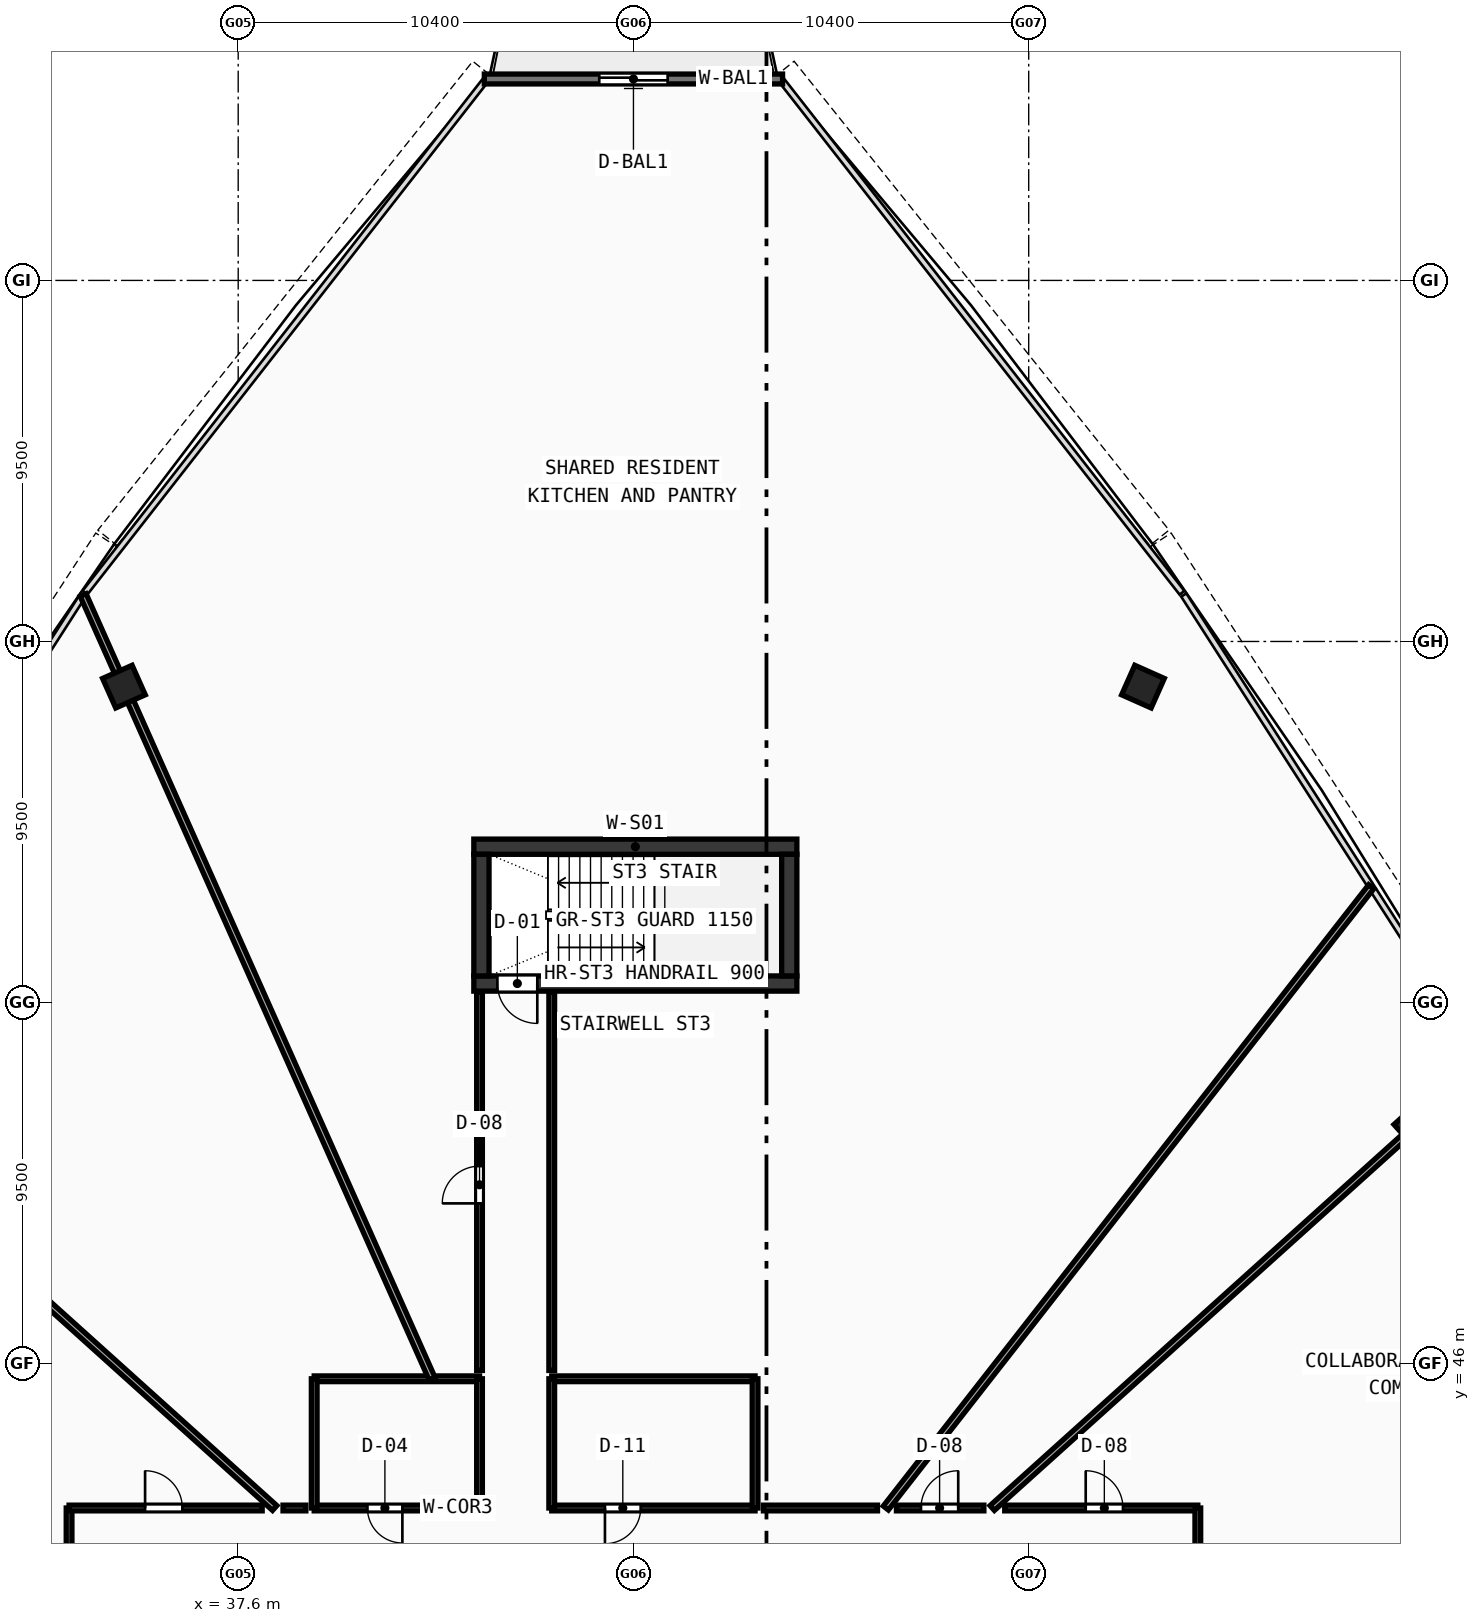
"""IFC4 building model, lengths in metres.
Left out: names, types, materials, properties, quantities, classifications, styles, units other than length and angle.
Written with IfcOpenShell. Run it as: python <this file> out.ifc"""

import sys

from ifc_helpers import new_model, si_unit, direction, frame, frame_2d, origin, origin_with_axes, origin_2d, place, context, subcontext, project, spatial, rectangle, hollow_rectangle, extrude, source, transform, mapped, element, fill, save


model = new_model("IFC4")
c1 = context("Model", 3, precision=1e-05, world=origin(), true_north=direction((0.0, 1.0)))
c2 = subcontext(c1, "Body", "Model", "MODEL_VIEW")
j1 = project(units=[si_unit("LENGTHUNIT", "METRE"), si_unit("PLANEANGLEUNIT", "RADIAN")], contexts=[c1])
p1 = place(None, origin())
s1 = spatial("IfcSite", under=j1, at=p1, CompositionType="ELEMENT")
p2 = place(p1, origin())
s2 = spatial("IfcBuilding", under=s1, at=p2, CompositionType="ELEMENT")
p3 = place(p2, frame((0.0, 0.0, 240.8)))
s3 = spatial("IfcBuildingStorey", under=s2, at=p3, CompositionType="ELEMENT", Elevation=240.8)
p4 = place(p3, frame((43.8, 59.6, 0.0), z_axis=(0.0, 0.0, 1.0), x_axis=(1.0, 0.0, 0.0)))
e1 = element("IfcWall", 1, at=p4, inside=s3, PredefinedType="SHEAR", context=c2, shape_type="SweptSolid", body=[
    extrude(rectangle(XDim=8.5, YDim=0.4, at=frame_2d((4.25, 0.0))), origin(), (0.0, 0.0, 1.0), 3.47),
])
p5 = place(p3, frame((43.8, 56.0, 0.0), z_axis=(0.0, 0.0, 1.0), x_axis=(1.0, 0.0, 0.0)))
e2 = element("IfcWall", 2, at=p5, inside=s3, PredefinedType="SHEAR", context=c2, shape_type="SweptSolid", body=[
    extrude(rectangle(XDim=8.5, YDim=0.4, at=frame_2d((4.25, 0.0))), origin(), (0.0, 0.0, 1.0), 3.47),
])
p6 = place(p5, frame((0.62, 0.0, 0.0)))
e3 = element("IfcOpeningElement", 3, at=p6, cuts=e2, PredefinedType="OPENING", context=c2, shape_type="SweptSolid", body=[
    extrude(rectangle(XDim=1.05, YDim=2.1, at=frame_2d((0.525, 1.05))), frame((0.0, 0.21, 0.0), z_axis=(0.0, -1.0, 0.0), x_axis=(1.0, 0.0, 0.0)), (0.0, 0.0, 1.0), 0.42),
])
for number, where, z_axis, x_axis in (
    (4, (44.0, 56.2, 0.0), (0.0, 0.0, 1.0), (0.0, 1.0, 0.0)),
    (5, (52.1, 56.2, 0.0), (0.0, 0.0, 1.0), (0.0, 1.0, 0.0)),
):
    element("IfcWall", number, at=place(p3, frame(where, z_axis=z_axis, x_axis=x_axis)), inside=s3, PredefinedType="SHEAR", context=c2, shape_type="SweptSolid", body=[
        extrude(rectangle(XDim=3.2, YDim=0.4, at=frame_2d((1.6, 0.0))), origin(), (0.0, 0.0, 1.0), 3.47),
    ])
m1 = source(origin(), c2, "Body", "SweptSolid", [
    extrude(hollow_rectangle(XDim=0.85, YDim=0.85, WallThickness=0.034, at=origin_2d()), origin(), (0.0, 0.0, 1.0), 3.73),
])
for number, where, z_axis, x_axis in (
    (6, (68.612, 52.259, -0.26), (0.0, 0.0, 1.0), (-0.669, 0.743, 0.0)),
    (7, (61.407, 63.812, -0.26), (0.0, 0.0, 1.0), (-0.914, 0.407, 0.0)),
    (8, (34.593, 63.812, -0.26), (0.0, 0.0, 1.0), (-0.914, -0.407, 0.0)),
):
    element("IfcColumn", number, at=place(p3, frame(where, z_axis=z_axis, x_axis=x_axis)), inside=s3, PredefinedType="COLUMN", context=c2, shape_type="MappedRepresentation", body=[
        mapped(m1, transform((0.0, 0.0, 0.0), scale=1.0)),
    ])
p7 = place(p3, frame((51.924, 79.8, 0.0), z_axis=(0.0, 0.0, 1.0), x_axis=(-1.0, 0.0, 0.0)))
e9 = element("IfcWall", 9, at=p7, inside=s3, PredefinedType="STANDARD", context=c2, shape_type="SweptSolid", body=[
    extrude(rectangle(XDim=7.847, YDim=0.26, at=frame_2d((3.924, 0.0))), origin(), (0.0, 0.0, 1.0), 3.47),
])
p8 = place(p7, frame((3.024, 0.0, 0.0)))
e10 = element("IfcOpeningElement", 10, at=p8, cuts=e9, PredefinedType="OPENING", context=c2, shape_type="SweptSolid", body=[
    extrude(rectangle(XDim=1.8, YDim=2.15, at=frame_2d((0.9, 1.075))), frame((0.0, 0.14, 0.0), z_axis=(0.0, -1.0, 0.0), x_axis=(1.0, 0.0, 0.0)), (0.0, 0.0, 1.0), 0.28),
])
p9 = place(p3, frame((39.6, 42.2, 0.0), z_axis=(0.0, 0.0, 1.0), x_axis=(1.0, 0.0, 0.0)))
e11 = element("IfcWall", 11, at=p9, inside=s3, PredefinedType="PARTITIONING", context=c2, shape_type="SweptSolid", body=[
    extrude(rectangle(XDim=4.35, YDim=0.15, at=frame_2d((2.175, 0.0))), origin(), (0.0, 0.0, 1.0), 3.47),
])
p10 = place(p9, frame((1.4, 0.0, 0.0)))
e12 = element("IfcOpeningElement", 12, at=p10, cuts=e11, PredefinedType="OPENING", context=c2, shape_type="SweptSolid", body=[
    extrude(rectangle(XDim=0.92, YDim=2.1, at=frame_2d((0.46, 1.05))), frame((0.0, 0.085, 0.0), z_axis=(0.0, -1.0, 0.0), x_axis=(1.0, 0.0, 0.0)), (0.0, 0.0, 1.0), 0.17),
])
p11 = place(p3, frame((39.6, 45.6, 0.0), z_axis=(0.0, 0.0, 1.0), x_axis=(1.0, 0.0, 0.0)))
e13 = element("IfcWall", 13, at=p11, inside=s3, PredefinedType="PARTITIONING", context=c2, shape_type="SweptSolid", body=[
    extrude(rectangle(XDim=4.35, YDim=0.15, at=frame_2d((2.175, 0.0))), origin(), (0.0, 0.0, 1.0), 2.82),
])
p12 = place(p3, frame((39.6, 42.2, 0.0), z_axis=(0.0, 0.0, 1.0), x_axis=(0.0, 1.0, 0.0)))
e14 = element("IfcWall", 14, at=p12, inside=s3, PredefinedType="PARTITIONING", context=c2, shape_type="SweptSolid", body=[
    extrude(rectangle(XDim=3.4, YDim=0.15, at=frame_2d((1.7, 0.0))), origin(), (0.0, 0.0, 1.0), 3.47),
])
p13 = place(p3, frame((43.95, 42.2, 0.0), z_axis=(0.0, 0.0, 1.0), x_axis=(0.0, 1.0, 0.0)))
e15 = element("IfcWall", 15, at=p13, inside=s3, PredefinedType="PARTITIONING", context=c2, shape_type="SweptSolid", body=[
    extrude(rectangle(XDim=3.4, YDim=0.15, at=frame_2d((1.7, 0.0))), origin(), (0.0, 0.0, 1.0), 2.82),
])
p14 = place(p3, frame((45.85, 42.2, 0.0), z_axis=(0.0, 0.0, 1.0), x_axis=(1.0, 0.0, 0.0)))
e16 = element("IfcWall", 16, at=p14, inside=s3, PredefinedType="PARTITIONING", context=c2, shape_type="SweptSolid", body=[
    extrude(rectangle(XDim=5.35, YDim=0.15, at=frame_2d((2.675, 0.0))), origin(), (0.0, 0.0, 1.0), 3.47),
])
p15 = place(p14, frame((1.4, 0.0, 0.0)))
e17 = element("IfcOpeningElement", 17, at=p15, cuts=e16, PredefinedType="OPENING", context=c2, shape_type="SweptSolid", body=[
    extrude(rectangle(XDim=0.94, YDim=2.1, at=frame_2d((0.47, 1.05))), frame((0.0, 0.085, 0.0), z_axis=(0.0, -1.0, 0.0), x_axis=(1.0, 0.0, 0.0)), (0.0, 0.0, 1.0), 0.17),
])
p16 = place(p3, frame((45.85, 45.6, 0.0), z_axis=(0.0, 0.0, 1.0), x_axis=(1.0, 0.0, 0.0)))
e18 = element("IfcWall", 18, at=p16, inside=s3, PredefinedType="PARTITIONING", context=c2, shape_type="SweptSolid", body=[
    extrude(rectangle(XDim=5.35, YDim=0.15, at=frame_2d((2.675, 0.0))), origin(), (0.0, 0.0, 1.0), 3.47),
])
for number, where, z_axis, x_axis in (
    (19, (45.85, 42.2, 0.0), (0.0, 0.0, 1.0), (0.0, 1.0, 0.0)),
    (20, (51.2, 42.2, 0.0), (0.0, 0.0, 1.0), (0.0, 1.0, 0.0)),
):
    element("IfcWall", number, at=place(p3, frame(where, z_axis=z_axis, x_axis=x_axis)), inside=s3, PredefinedType="PARTITIONING", context=c2, shape_type="SweptSolid", body=[
        extrude(rectangle(XDim=3.4, YDim=0.15, at=frame_2d((1.7, 0.0))), origin(), (0.0, 0.0, 1.0), 3.47),
    ])
p17 = place(p3, frame((62.85, 38.525, 0.0), z_axis=(0.0, 0.0, 1.0), x_axis=(0.951060404644, 0.309005027011, 0.0)))
e21 = element("IfcWall", 21, at=p17, inside=s3, PredefinedType="PARTITIONING", context=c2, shape_type="SweptSolid", body=[
    extrude(rectangle(XDim=14.032, YDim=0.17, at=frame_2d((7.016, 0.0))), origin(), (0.0, 0.0, 1.0), 2.82),
])
p18 = place(p3, frame((57.44, 42.2, 0.0), z_axis=(0.0, 0.0, 1.0), x_axis=(0.743140424774, 0.669135493802, 0.0)))
e22 = element("IfcWall", 22, at=p18, inside=s3, PredefinedType="PARTITIONING", context=c2, shape_type="SweptSolid", body=[
    extrude(rectangle(XDim=17.455, YDim=0.17, at=frame_2d((8.728, 0.0))), origin(), (0.0, 0.0, 1.0), 2.82),
])
p19 = place(p3, frame((54.641, 42.2, 0.0), z_axis=(0.0, 0.0, 1.0), x_axis=(0.615664824624, 0.788008136837, 0.0)))
e23 = element("IfcWall", 23, at=p19, inside=s3, PredefinedType="PARTITIONING", context=c2, shape_type="SweptSolid", body=[
    extrude(rectangle(XDim=20.745, YDim=0.17, at=frame_2d((10.372, 0.0))), origin(), (0.0, 0.0, 1.0), 2.82),
])
p20 = place(p3, frame((42.702, 45.6, 0.0), z_axis=(0.0, 0.0, 1.0), x_axis=(-0.406745472033, 0.913541526686, 0.0)))
e24 = element("IfcWall", 24, at=p20, inside=s3, PredefinedType="PARTITIONING", context=c2, shape_type="SweptSolid", body=[
    extrude(rectangle(XDim=22.574, YDim=0.17, at=frame_2d((11.287, 0.0))), origin(), (0.0, 0.0, 1.0), 2.82),
])
p21 = place(p3, frame((38.56, 42.2, 0.0), z_axis=(0.0, 0.0, 1.0), x_axis=(-0.743140424774, 0.669135493802, 0.0)))
e25 = element("IfcWall", 25, at=p21, inside=s3, PredefinedType="PARTITIONING", context=c2, shape_type="SweptSolid", body=[
    extrude(rectangle(XDim=17.455, YDim=0.17, at=frame_2d((8.728, 0.0))), origin(), (0.0, 0.0, 1.0), 2.82),
])
p22 = place(p3, frame((33.15, 38.525, 0.0), z_axis=(0.0, 0.0, 1.0), x_axis=(-0.951060404644, 0.309005027011, 0.0)))
e26 = element("IfcWall", 26, at=p22, inside=s3, PredefinedType="PARTITIONING", context=c2, shape_type="SweptSolid", body=[
    extrude(rectangle(XDim=14.032, YDim=0.17, at=frame_2d((7.016, 0.0))), origin(), (0.0, 0.0, 1.0), 2.82),
])
p23 = place(p3, frame((33.15, 38.756, 0.0), z_axis=(0.0, 0.0, 1.0), x_axis=(0.0, 1.0, 0.0)))
e27 = element("IfcWall", 27, at=p23, inside=s3, PredefinedType="PARTITIONING", context=c2, shape_type="SweptSolid", body=[
    extrude(rectangle(XDim=3.444, YDim=0.15, at=frame_2d((1.722, 0.0))), origin(), (0.0, 0.0, 1.0), 3.12),
])
p24 = place(p3, frame((33.15, 42.2, 0.0), z_axis=(0.0, 0.0, 1.0), x_axis=(1.0, 0.0, 0.0)))
e28 = element("IfcWall", 28, at=p24, inside=s3, PredefinedType="PARTITIONING", context=c2, shape_type="SweptSolid", body=[
    extrude(rectangle(XDim=5.081, YDim=0.15, at=frame_2d((2.541, 0.0))), origin(), (0.0, 0.0, 1.0), 3.12),
])
p25 = place(p24, frame((2.0, 0.0, 0.0)))
e29 = element("IfcOpeningElement", 29, at=p25, cuts=e28, PredefinedType="OPENING", context=c2, shape_type="SweptSolid", body=[
    extrude(rectangle(XDim=0.98, YDim=2.12, at=frame_2d((0.49, 1.06))), frame((0.0, 0.085, 0.0), z_axis=(0.0, -1.0, 0.0), x_axis=(1.0, 0.0, 0.0)), (0.0, 0.0, 1.0), 0.17),
])
p26 = place(p3, frame((38.78, 42.2, 0.0), z_axis=(0.0, 0.0, 1.0), x_axis=(1.0, 0.0, 0.0)))
e30 = element("IfcWall", 30, at=p26, inside=s3, PredefinedType="PARTITIONING", context=c2, shape_type="SweptSolid", body=[
    extrude(rectangle(XDim=0.6, YDim=0.15, at=frame_2d((0.3, 0.0))), origin(), (0.0, 0.0, 1.0), 2.82),
])
p27 = place(p3, frame((43.95, 45.82, 0.0), z_axis=(0.0, 0.0, 1.0), x_axis=(0.0, 1.0, 0.0)))
e31 = element("IfcWall", 31, at=p27, inside=s3, PredefinedType="PARTITIONING", context=c2, shape_type="SweptSolid", body=[
    extrude(rectangle(XDim=9.96, YDim=0.15, at=frame_2d((4.98, 0.0))), origin(), (0.0, 0.0, 1.0), 3.12),
])
p28 = place(p27, frame((4.395, 0.0, 0.0)))
e32 = element("IfcOpeningElement", 32, at=p28, cuts=e31, PredefinedType="OPENING", context=c2, shape_type="SweptSolid", body=[
    extrude(rectangle(XDim=0.98, YDim=2.12, at=frame_2d((0.49, 1.06))), frame((0.0, 0.085, 0.0), z_axis=(0.0, -1.0, 0.0), x_axis=(1.0, 0.0, 0.0)), (0.0, 0.0, 1.0), 0.17),
])
p29 = place(p3, frame((45.85, 55.78, 0.0), z_axis=(0.0, 0.0, 1.0), x_axis=(0.0, -1.0, 0.0)))
e33 = element("IfcWall", 33, at=p29, inside=s3, PredefinedType="PARTITIONING", context=c2, shape_type="SweptSolid", body=[
    extrude(rectangle(XDim=9.96, YDim=0.15, at=frame_2d((4.98, 0.0))), origin(), (0.0, 0.0, 1.0), 3.12),
])
p30 = place(p3, frame((51.42, 42.2, 0.0), z_axis=(0.0, 0.0, 1.0), x_axis=(1.0, 0.0, 0.0)))
e34 = element("IfcWall", 34, at=p30, inside=s3, PredefinedType="PARTITIONING", context=c2, shape_type="SweptSolid", body=[
    extrude(rectangle(XDim=3.001, YDim=0.15, at=frame_2d((1.5, 0.0))), origin(), (0.0, 0.0, 1.0), 2.82),
])
p31 = place(p3, frame((54.92, 42.2, 0.0), z_axis=(0.0, 0.0, 1.0), x_axis=(1.0, 0.0, 0.0)))
e35 = element("IfcWall", 35, at=p31, inside=s3, PredefinedType="PARTITIONING", context=c2, shape_type="SweptSolid", body=[
    extrude(rectangle(XDim=2.3, YDim=0.15, at=frame_2d((1.15, 0.0))), origin(), (0.0, 0.0, 1.0), 2.82),
])
p32 = place(p31, frame((0.646, 0.0, 0.0)))
e36 = element("IfcOpeningElement", 36, at=p32, cuts=e35, PredefinedType="OPENING", context=c2, shape_type="SweptSolid", body=[
    extrude(rectangle(XDim=0.98, YDim=2.12, at=frame_2d((0.49, 1.06))), frame((0.0, 0.085, 0.0), z_axis=(0.0, -1.0, 0.0), x_axis=(1.0, 0.0, 0.0)), (0.0, 0.0, 1.0), 0.17),
])
p33 = place(p3, frame((57.769, 42.2, 0.0), z_axis=(0.0, 0.0, 1.0), x_axis=(1.0, 0.0, 0.0)))
e37 = element("IfcWall", 37, at=p33, inside=s3, PredefinedType="PARTITIONING", context=c2, shape_type="SweptSolid", body=[
    extrude(rectangle(XDim=5.081, YDim=0.15, at=frame_2d((2.541, 0.0))), origin(), (0.0, 0.0, 1.0), 3.12),
])
p34 = place(p33, frame((2.131, 0.0, 0.0)))
e38 = element("IfcOpeningElement", 38, at=p34, cuts=e37, PredefinedType="OPENING", context=c2, shape_type="SweptSolid", body=[
    extrude(rectangle(XDim=0.98, YDim=2.12, at=frame_2d((0.49, 1.06))), frame((0.0, 0.085, 0.0), z_axis=(0.0, -1.0, 0.0), x_axis=(1.0, 0.0, 0.0)), (0.0, 0.0, 1.0), 0.17),
])
p35 = place(p3, frame((62.85, 42.2, 0.0), z_axis=(0.0, 0.0, 1.0), x_axis=(0.0, -1.0, 0.0)))
e39 = element("IfcWall", 39, at=p35, inside=s3, PredefinedType="PARTITIONING", context=c2, shape_type="SweptSolid", body=[
    extrude(rectangle(XDim=3.444, YDim=0.15, at=frame_2d((1.722, 0.0))), origin(), (0.0, 0.0, 1.0), 3.12),
])
m2 = source(origin(), c2, "Body", "SweptSolid", [
    extrude(rectangle(XDim=1.8, YDim=2.15, at=frame_2d((0.9, 1.075))), frame((0.0, 0.025, 0.0), z_axis=(0.0, -1.0, 0.0), x_axis=(1.0, 0.0, 0.0)), (0.0, 0.0, 1.0), 0.05),
])
p36 = place(p8, origin_with_axes())
e40 = element("IfcDoor", 40, at=p36, inside=s3, OperationType="DOUBLE_DOOR_SLIDING", PredefinedType="DOOR", context=c2, shape_type="MappedRepresentation", body=[
    mapped(m2, transform((0.0, 0.0, 0.0), scale=1.0)),
])
fill(e10, e40)
m3 = source(origin(), c2, "Body", "SweptSolid", [
    extrude(rectangle(XDim=1.05, YDim=2.1, at=frame_2d((0.525, 1.05))), frame((0.0, 0.025, 0.0), z_axis=(0.0, -1.0, 0.0), x_axis=(1.0, 0.0, 0.0)), (0.0, 0.0, 1.0), 0.05),
])
p37 = place(p6, frame((1.05, 0.0, 0.0), z_axis=(0.0, 0.0, 1.0), x_axis=(-1.0, 0.0, 0.0)))
e41 = element("IfcDoor", 41, at=p37, inside=s3, OperationType="SINGLE_SWING_LEFT", PredefinedType="DOOR", context=c2, shape_type="MappedRepresentation", body=[
    mapped(m3, transform((0.0, 0.0, 0.0), scale=1.0)),
])
fill(e3, e41)
m4 = source(origin(), c2, "Body", "SweptSolid", [
    extrude(rectangle(XDim=0.92, YDim=2.1, at=frame_2d((0.46, 1.05))), frame((0.0, 0.025, 0.0), z_axis=(0.0, -1.0, 0.0), x_axis=(1.0, 0.0, 0.0)), (0.0, 0.0, 1.0), 0.05),
])
p38 = place(p10, frame((0.92, 0.0, 0.0), z_axis=(0.0, 0.0, 1.0), x_axis=(-1.0, 0.0, 0.0)))
e42 = element("IfcDoor", 42, at=p38, inside=s3, OperationType="SINGLE_SWING_LEFT", PredefinedType="DOOR", context=c2, shape_type="MappedRepresentation", body=[
    mapped(m4, transform((0.0, 0.0, 0.0), scale=1.0)),
])
fill(e12, e42)
m5 = source(origin(), c2, "Body", "SweptSolid", [
    extrude(rectangle(XDim=0.94, YDim=2.1, at=frame_2d((0.47, 1.05))), frame((0.0, 0.025, 0.0), z_axis=(0.0, -1.0, 0.0), x_axis=(1.0, 0.0, 0.0)), (0.0, 0.0, 1.0), 0.05),
])
p39 = place(p15, frame((0.94, 0.0, 0.0), z_axis=(0.0, 0.0, 1.0), x_axis=(-1.0, 0.0, 0.0)))
e43 = element("IfcDoor", 43, at=p39, inside=s3, OperationType="SINGLE_SWING_RIGHT", PredefinedType="DOOR", context=c2, shape_type="MappedRepresentation", body=[
    mapped(m5, transform((0.0, 0.0, 0.0), scale=1.0)),
])
fill(e17, e43)
m6 = source(origin(), c2, "Body", "SweptSolid", [
    extrude(rectangle(XDim=0.98, YDim=2.12, at=frame_2d((0.49, 1.06))), frame((0.0, 0.025, 0.0), z_axis=(0.0, -1.0, 0.0), x_axis=(1.0, 0.0, 0.0)), (0.0, 0.0, 1.0), 0.05),
])
p40 = place(p34, origin_with_axes())
e44 = element("IfcDoor", 44, at=p40, inside=s3, OperationType="SINGLE_SWING_LEFT", PredefinedType="DOOR", context=c2, shape_type="MappedRepresentation", body=[
    mapped(m6, transform((0.0, 0.0, 0.0), scale=1.0)),
])
fill(e38, e44)
p41 = place(p32, origin_with_axes())
e45 = element("IfcDoor", 45, at=p41, inside=s3, OperationType="SINGLE_SWING_RIGHT", PredefinedType="DOOR", context=c2, shape_type="MappedRepresentation", body=[
    mapped(m6, transform((0.0, 0.0, 0.0), scale=1.0)),
])
fill(e36, e45)
p42 = place(p28, origin_with_axes())
e46 = element("IfcDoor", 46, at=p42, inside=s3, OperationType="SINGLE_SWING_LEFT", PredefinedType="DOOR", context=c2, shape_type="MappedRepresentation", body=[
    mapped(m6, transform((0.0, 0.0, 0.0), scale=1.0)),
])
fill(e32, e46)
p43 = place(p25, origin_with_axes())
e47 = element("IfcDoor", 47, at=p43, inside=s3, OperationType="SINGLE_SWING_LEFT", PredefinedType="DOOR", context=c2, shape_type="MappedRepresentation", body=[
    mapped(m6, transform((0.0, 0.0, 0.0), scale=1.0)),
])
fill(e29, e47)
save(model, sys.argv[1])
